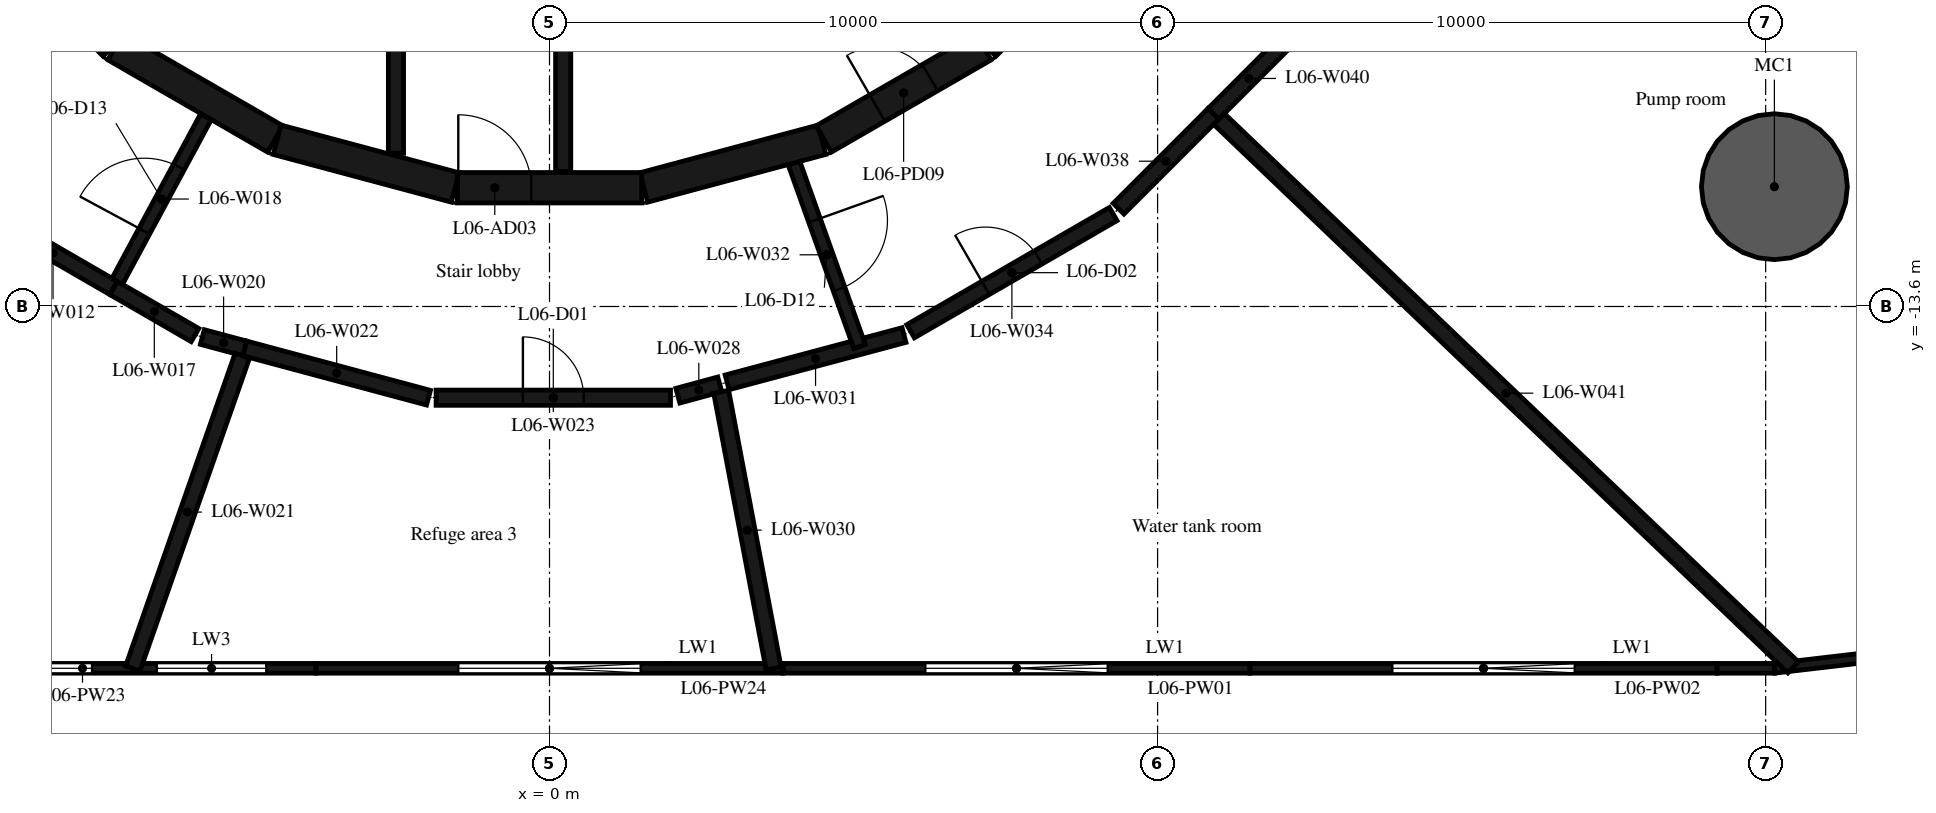
"""IFC4 building model, lengths in metres.
Left out: names, types, materials, properties, quantities, classifications, styles, units other than length and angle.
Written with IfcOpenShell. Run it as: python <this file> out.ifc"""

import sys

from ifc_helpers import new_model, si_unit, direction, frame, frame_2d, origin, origin_2d, place, context, subcontext, project, spatial, rectangle, hollow_circle, extrude, element, fill, save


model = new_model("IFC4")
c1 = context("Model", 3, precision=1e-05, world=origin(), true_north=direction((0.0, 1.0)))
c2 = subcontext(c1, "Body", "Model", "MODEL_VIEW")
j1 = project(units=[si_unit("LENGTHUNIT", "METRE"), si_unit("PLANEANGLEUNIT", "RADIAN")], contexts=[c1])
p1 = place(None, origin())
s1 = spatial("IfcSite", under=j1, at=p1, CompositionType="ELEMENT")
p2 = place(p1, origin())
s2 = spatial("IfcBuilding", under=s1, at=p2, CompositionType="ELEMENT")
p3 = place(p2, frame((0.0, 0.0, 33.0)))
s3 = spatial("IfcBuildingStorey", under=s2, at=p3, CompositionType="ELEMENT", Elevation=33.0)
p4 = place(p3, frame((20.144, -11.63, -0.45), z_axis=(0.0, 0.0, 1.0), x_axis=(1.0, 0.0, 0.0)))
e1 = element("IfcColumn", 1, at=p4, inside=s3, PredefinedType="COLUMN", context=c2, shape_type="SweptSolid", body=[
    extrude(hollow_circle(Radius=1.2, WallThickness=0.06, at=origin_2d()), origin(), (0.0, 0.0, 1.0), 5.4),
])
p5 = place(p3, frame((3.84, -19.55, 0.0), z_axis=(0.0, 0.0, 1.0), x_axis=(1.0, 0.0, 0.0)))
e2 = element("IfcWall", 2, at=p5, inside=s3, PredefinedType="STANDARD", context=c2, shape_type="SweptSolid", body=[
    extrude(rectangle(XDim=7.68, YDim=0.16, at=frame_2d((3.84, 0.0))), origin(), (0.0, 0.0, 1.0), 4.95),
])
p6 = place(p5, frame((2.34, 0.0, 1.0)))
e3 = element("IfcOpeningElement", 3, at=p6, cuts=e2, PredefinedType="OPENING", context=c2, shape_type="SweptSolid", body=[
    extrude(rectangle(XDim=3.0, YDim=2.2, at=frame_2d((1.5, 1.1))), frame((0.0, 0.09, 0.0), z_axis=(0.0, -1.0, 0.0), x_axis=(1.0, 0.0, 0.0)), (0.0, 0.0, 1.0), 0.18),
])
p7 = place(p3, frame((11.52, -19.55, 0.0), z_axis=(0.0, 0.0, 1.0), x_axis=(1.0, 0.0, 0.0)))
e4 = element("IfcWall", 4, at=p7, inside=s3, PredefinedType="STANDARD", context=c2, shape_type="SweptSolid", body=[
    extrude(rectangle(XDim=7.68, YDim=0.16, at=frame_2d((3.84, 0.0))), origin(), (0.0, 0.0, 1.0), 4.95),
])
p8 = place(p7, frame((2.34, 0.0, 1.0)))
e5 = element("IfcOpeningElement", 5, at=p8, cuts=e4, PredefinedType="OPENING", context=c2, shape_type="SweptSolid", body=[
    extrude(rectangle(XDim=3.0, YDim=2.2, at=frame_2d((1.5, 1.1))), frame((0.0, 0.09, 0.0), z_axis=(0.0, -1.0, 0.0), x_axis=(1.0, 0.0, 0.0)), (0.0, 0.0, 1.0), 0.18),
])
p9 = place(p3, frame((19.2, -19.55, 0.0), z_axis=(0.0, 0.0, 1.0), x_axis=(1.0, 0.0, 0.0)))
e6 = element("IfcWall", 6, at=p9, inside=s3, PredefinedType="STANDARD", context=c2, shape_type="SweptSolid", body=[
    extrude(rectangle(XDim=0.946, YDim=0.16, at=frame_2d((0.473, 0.0))), origin(), (0.0, 0.0, 1.0), 4.95),
])
p10 = place(p3, frame((20.141, -19.55, 0.0), z_axis=(0.0, 0.0, 1.0), x_axis=(0.993233418606, 0.116135163342, 0.0)))
e7 = element("IfcWall", 7, at=p10, inside=s3, PredefinedType="STANDARD", context=c2, shape_type="SweptSolid", body=[
    extrude(rectangle(XDim=1.846, YDim=0.16, at=frame_2d((0.923, 0.0))), origin(), (0.0, 0.0, 1.0), 4.95),
])
p11 = place(p3, frame((-11.52, -19.55, 0.0), z_axis=(0.0, 0.0, 1.0), x_axis=(1.0, 0.0, 0.0)))
e8 = element("IfcWall", 8, at=p11, inside=s3, PredefinedType="STANDARD", context=c2, shape_type="SweptSolid", body=[
    extrude(rectangle(XDim=7.68, YDim=0.16, at=frame_2d((3.84, 0.0))), origin(), (0.0, 0.0, 1.0), 4.95),
])
p12 = place(p11, frame((0.998, 0.0, 1.0)))
e9 = element("IfcOpeningElement", 9, at=p12, cuts=e8, PredefinedType="OPENING", context=c2, shape_type="SweptSolid", body=[
    extrude(rectangle(XDim=3.0, YDim=2.2, at=frame_2d((1.5, 1.1))), frame((0.0, 0.09, 0.0), z_axis=(0.0, -1.0, 0.0), x_axis=(1.0, 0.0, 0.0)), (0.0, 0.0, 1.0), 0.18),
])
p13 = place(p11, frame((5.062, 0.0, 1.0)))
e10 = element("IfcOpeningElement", 10, at=p13, cuts=e8, PredefinedType="OPENING", context=c2, shape_type="SweptSolid", body=[
    extrude(rectangle(XDim=1.8, YDim=2.2, at=frame_2d((0.9, 1.1))), frame((0.0, 0.09, 0.0), z_axis=(0.0, -1.0, 0.0), x_axis=(1.0, 0.0, 0.0)), (0.0, 0.0, 1.0), 0.18),
])
p14 = place(p3, frame((-3.84, -19.55, 0.0), z_axis=(0.0, 0.0, 1.0), x_axis=(1.0, 0.0, 0.0)))
e11 = element("IfcWall", 11, at=p14, inside=s3, PredefinedType="STANDARD", context=c2, shape_type="SweptSolid", body=[
    extrude(rectangle(XDim=7.68, YDim=0.16, at=frame_2d((3.84, 0.0))), origin(), (0.0, 0.0, 1.0), 4.95),
])
p15 = place(p14, frame((2.34, 0.0, 1.0)))
e12 = element("IfcOpeningElement", 12, at=p15, cuts=e11, PredefinedType="OPENING", context=c2, shape_type="SweptSolid", body=[
    extrude(rectangle(XDim=3.0, YDim=2.2, at=frame_2d((1.5, 1.1))), frame((0.0, 0.09, 0.0), z_axis=(0.0, -1.0, 0.0), x_axis=(1.0, 0.0, 0.0)), (0.0, 0.0, 1.0), 0.18),
])
p16 = place(p3, frame((1.55, -11.643, 0.0), z_axis=(0.0, 0.0, 1.0), x_axis=(0.965948410781, 0.258734743916, 0.0)))
e13 = element("IfcWall", 13, at=p16, inside=s3, PredefinedType="SHEAR", context=c2, shape_type="SweptSolid", body=[
    extrude(rectangle(XDim=3.033, YDim=0.5, at=frame_2d((1.516, 0.0))), origin(), (0.0, 0.0, 1.0), 4.95),
])
p17 = place(p3, frame((4.51, -10.845, 0.0), z_axis=(0.0, 0.0, 1.0), x_axis=(0.865975092491, 0.500087131594, 0.0)))
e14 = element("IfcWall", 14, at=p17, inside=s3, PredefinedType="SHEAR", context=c2, shape_type="SweptSolid", body=[
    extrude(rectangle(XDim=3.033, YDim=0.5, at=frame_2d((1.516, 0.0))), origin(), (0.0, 0.0, 1.0), 4.95),
])
p18 = place(p17, frame((1.016, 0.0, 0.0)))
e15 = element("IfcOpeningElement", 15, at=p18, cuts=e14, PredefinedType="OPENING", context=c2, shape_type="SweptSolid", body=[
    extrude(rectangle(XDim=1.0, YDim=2.4, at=frame_2d((0.5, 1.2))), frame((0.0, 0.26, 0.0), z_axis=(0.0, -1.0, 0.0), x_axis=(1.0, 0.0, 0.0)), (0.0, 0.0, 1.0), 0.52),
])
for number, where, z_axis, x_axis in (
    (16, (7.164, -9.308, 0.0), (0.0, 0.0, 1.0), (0.707, 0.707, 0.0)),
    (17, (-9.308, -7.164, 0.0), (0.0, 0.0, 1.0), (0.707, -0.707, 0.0)),
):
    element("IfcWall", number, at=place(p3, frame(where, z_axis=z_axis, x_axis=x_axis)), inside=s3, PredefinedType="SHEAR", context=c2, shape_type="SweptSolid", body=[
        extrude(rectangle(XDim=3.032, YDim=0.5, at=frame_2d((1.516, 0.0))), origin(), (0.0, 0.0, 1.0), 4.95),
    ])
for number, where, z_axis, x_axis in (
    (18, (-7.137, -9.329, 0.0), (0.0, 0.0, 1.0), (0.866, -0.5, 0.0)),
    (19, (-4.479, -10.858, 0.0), (0.0, 0.0, 1.0), (0.966, -0.259, 0.0)),
):
    element("IfcWall", number, at=place(p3, frame(where, z_axis=z_axis, x_axis=x_axis)), inside=s3, PredefinedType="SHEAR", context=c2, shape_type="SweptSolid", body=[
        extrude(rectangle(XDim=3.033, YDim=0.5, at=frame_2d((1.516, 0.0))), origin(), (0.0, 0.0, 1.0), 4.95),
    ])
p19 = place(p3, frame((-1.516, -11.647, 0.0), z_axis=(0.0, 0.0, 1.0), x_axis=(1.0, 0.0, 0.0)))
e20 = element("IfcWall", 20, at=p19, inside=s3, PredefinedType="SHEAR", context=c2, shape_type="SweptSolid", body=[
    extrude(rectangle(XDim=3.033, YDim=0.5, at=frame_2d((1.516, 0.0))), origin(), (0.0, 0.0, 1.0), 4.95),
])
p20 = place(p19, frame((0.016, 0.0, 0.0)))
e21 = element("IfcOpeningElement", 21, at=p20, cuts=e20, PredefinedType="OPENING", context=c2, shape_type="SweptSolid", body=[
    extrude(rectangle(XDim=1.2, YDim=2.1, at=frame_2d((0.6, 1.05))), frame((0.0, 0.26, 0.0), z_axis=(0.0, -1.0, 0.0), x_axis=(1.0, 0.0, 0.0)), (0.0, 0.0, 1.0), 0.52),
])
p21 = place(p3, frame((-2.525, -8.97, 0.0), z_axis=(0.0, 0.0, 1.0), x_axis=(0.0, -1.0, 0.0)))
e22 = element("IfcWall", 22, at=p21, inside=s3, PredefinedType="SHEAR", context=c2, shape_type="SweptSolid", body=[
    extrude(rectangle(XDim=2.11, YDim=0.25, at=frame_2d((1.055, 0.0))), origin(), (0.0, 0.0, 1.0), 4.95),
])
p22 = place(p3, frame((0.225, -8.97, 0.0), z_axis=(0.0, 0.0, 1.0), x_axis=(0.0, -1.0, 0.0)))
e23 = element("IfcWall", 23, at=p22, inside=s3, PredefinedType="SHEAR", context=c2, shape_type="SweptSolid", body=[
    extrude(rectangle(XDim=2.41, YDim=0.25, at=frame_2d((1.205, 0.0))), origin(), (0.0, 0.0, 1.0), 4.95),
])
p23 = place(p3, frame((-9.162, -12.143, 0.0), z_axis=(0.0, 0.0, 1.0), x_axis=(0.865576208327, -0.500777223502, 0.0)))
e24 = element("IfcWall", 24, at=p23, inside=s3, PredefinedType="PARTITIONING", context=c2, shape_type="SweptSolid", body=[
    extrude(rectangle(XDim=2.303, YDim=0.25, at=frame_2d((1.152, 0.0))), origin(), (0.0, 0.0, 1.0), 4.95),
])
p24 = place(p3, frame((-7.168, -13.296, 0.0), z_axis=(0.0, 0.0, 1.0), x_axis=(0.865606471313, -0.500724911325, 0.0)))
e25 = element("IfcWall", 25, at=p24, inside=s3, PredefinedType="PARTITIONING", context=c2, shape_type="SweptSolid", body=[
    extrude(rectangle(XDim=1.546, YDim=0.25, at=frame_2d((0.773, 0.0))), origin(), (0.0, 0.0, 1.0), 4.95),
])
p25 = place(p3, frame((-7.109, -13.186, 0.0), z_axis=(0.0, 0.0, 1.0), x_axis=(0.474511788195, 0.880249148176, 0.0)))
e26 = element("IfcWall", 26, at=p25, inside=s3, PredefinedType="PARTITIONING", context=c2, shape_type="SweptSolid", body=[
    extrude(rectangle(XDim=3.074, YDim=0.2, at=frame_2d((1.537, 0.0))), origin(), (0.0, 0.0, 1.0), 4.95),
])
p26 = place(p25, frame((0.937, 0.0, 0.0)))
e27 = element("IfcOpeningElement", 27, at=p26, cuts=e26, PredefinedType="OPENING", context=c2, shape_type="SweptSolid", body=[
    extrude(rectangle(XDim=1.2, YDim=2.1, at=frame_2d((0.6, 1.05))), frame((0.0, 0.11, 0.0), z_axis=(0.0, -1.0, 0.0), x_axis=(1.0, 0.0, 0.0)), (0.0, 0.0, 1.0), 0.22),
])
p27 = place(p3, frame((-5.709, -14.102, 0.0), z_axis=(0.0, 0.0, 1.0), x_axis=(0.965791356005, -0.25932037457, 0.0)))
e28 = element("IfcWall", 28, at=p27, inside=s3, PredefinedType="PARTITIONING", context=c2, shape_type="SweptSolid", body=[
    extrude(rectangle(XDim=0.724, YDim=0.25, at=frame_2d((0.362, 0.0))), origin(), (0.0, 0.0, 1.0), 4.95),
])
p28 = place(p3, frame((-5.051, -14.408, 0.0), z_axis=(0.0, 0.0, 1.0), x_axis=(-0.330509965362, -0.943802502008, 0.0)))
e29 = element("IfcWall", 29, at=p28, inside=s3, PredefinedType="PARTITIONING", context=c2, shape_type="SweptSolid", body=[
    extrude(rectangle(XDim=5.453, YDim=0.25, at=frame_2d((2.727, 0.0))), origin(), (0.0, 0.0, 1.0), 4.95),
])
p29 = place(p3, frame((-5.01, -14.29, 0.0), z_axis=(0.0, 0.0, 1.0), x_axis=(0.965858087727, -0.259071716659, 0.0)))
e30 = element("IfcWall", 30, at=p29, inside=s3, PredefinedType="PARTITIONING", context=c2, shape_type="SweptSolid", body=[
    extrude(rectangle(XDim=3.127, YDim=0.25, at=frame_2d((1.563, 0.0))), origin(), (0.0, 0.0, 1.0), 4.95),
])
p30 = place(p3, frame((-1.865, -15.1, 0.0), z_axis=(0.0, 0.0, 1.0), x_axis=(1.0, 0.0, 0.0)))
e31 = element("IfcWall", 31, at=p30, inside=s3, PredefinedType="PARTITIONING", context=c2, shape_type="SweptSolid", body=[
    extrude(rectangle(XDim=3.855, YDim=0.25, at=frame_2d((1.927, 0.0))), origin(), (0.0, 0.0, 1.0), 4.95),
])
p31 = place(p30, frame((1.427, 0.0, 0.0)))
e32 = element("IfcOpeningElement", 32, at=p31, cuts=e31, PredefinedType="OPENING", context=c2, shape_type="SweptSolid", body=[
    extrude(rectangle(XDim=1.0, YDim=2.1, at=frame_2d((0.5, 1.05))), frame((0.0, 0.135, 0.0), z_axis=(0.0, -1.0, 0.0), x_axis=(1.0, 0.0, 0.0)), (0.0, 0.0, 1.0), 0.27),
])
p32 = place(p3, frame((2.111, -15.067, 0.0), z_axis=(0.0, 0.0, 1.0), x_axis=(0.965039301335, 0.262105221007, 0.0)))
e33 = element("IfcWall", 33, at=p32, inside=s3, PredefinedType="PARTITIONING", context=c2, shape_type="SweptSolid", body=[
    extrude(rectangle(XDim=0.714, YDim=0.25, at=frame_2d((0.357, 0.0))), origin(), (0.0, 0.0, 1.0), 4.95),
])
p33 = place(p3, frame((2.823, -15.003, 0.0), z_axis=(0.0, 0.0, 1.0), x_axis=(0.186157236823, -0.982519965791, 0.0)))
e34 = element("IfcWall", 34, at=p33, inside=s3, PredefinedType="PARTITIONING", context=c2, shape_type="SweptSolid", body=[
    extrude(rectangle(XDim=4.629, YDim=0.25, at=frame_2d((2.315, 0.0))), origin(), (0.0, 0.0, 1.0), 4.95),
])
p34 = place(p3, frame((2.921, -14.848, 0.0), z_axis=(0.0, 0.0, 1.0), x_axis=(0.966090816863, 0.258202504969, 0.0)))
e35 = element("IfcWall", 35, at=p34, inside=s3, PredefinedType="PARTITIONING", context=c2, shape_type="SweptSolid", body=[
    extrude(rectangle(XDim=3.011, YDim=0.25, at=frame_2d((1.506, 0.0))), origin(), (0.0, 0.0, 1.0), 4.95),
])
p35 = place(p3, frame((4.02, -11.24, 0.0), z_axis=(0.0, 0.0, 1.0), x_axis=(0.336751058688, -0.941593715183, 0.0)))
e36 = element("IfcWall", 36, at=p35, inside=s3, PredefinedType="PARTITIONING", context=c2, shape_type="SweptSolid", body=[
    extrude(rectangle(XDim=3.207, YDim=0.2, at=frame_2d((1.604, 0.0))), origin(), (0.0, 0.0, 1.0), 4.95),
])
p36 = place(p35, frame((1.004, 0.0, 0.0)))
e37 = element("IfcOpeningElement", 37, at=p36, cuts=e36, PredefinedType="OPENING", context=c2, shape_type="SweptSolid", body=[
    extrude(rectangle(XDim=1.2, YDim=2.1, at=frame_2d((0.6, 1.05))), frame((0.0, 0.11, 0.0), z_axis=(0.0, -1.0, 0.0), x_axis=(1.0, 0.0, 0.0)), (0.0, 0.0, 1.0), 0.22),
])
p37 = place(p3, frame((5.938, -14.007, 0.0), z_axis=(0.0, 0.0, 1.0), x_axis=(0.865615852585, 0.500708693508, 0.0)))
e38 = element("IfcWall", 38, at=p37, inside=s3, PredefinedType="PARTITIONING", context=c2, shape_type="SweptSolid", body=[
    extrude(rectangle(XDim=3.849, YDim=0.25, at=frame_2d((1.925, 0.0))), origin(), (0.0, 0.0, 1.0), 4.95),
])
p38 = place(p37, frame((1.425, 0.0, 0.0)))
e39 = element("IfcOpeningElement", 39, at=p38, cuts=e38, PredefinedType="OPENING", context=c2, shape_type="SweptSolid", body=[
    extrude(rectangle(XDim=1.0, YDim=2.1, at=frame_2d((0.5, 1.05))), frame((0.0, 0.135, 0.0), z_axis=(0.0, -1.0, 0.0), x_axis=(1.0, 0.0, 0.0)), (0.0, 0.0, 1.0), 0.27),
])
p39 = place(p3, frame((9.358, -11.992, 0.0), z_axis=(0.0, 0.0, 1.0), x_axis=(0.707051506082, 0.707162051971, 0.0)))
e40 = element("IfcWall", 40, at=p39, inside=s3, PredefinedType="PARTITIONING", context=c2, shape_type="SweptSolid", body=[
    extrude(rectangle(XDim=2.208, YDim=0.25, at=frame_2d((1.104, 0.0))), origin(), (0.0, 0.0, 1.0), 4.95),
])
p40 = place(p3, frame((10.92, -10.43, 0.0), z_axis=(0.0, 0.0, 1.0), x_axis=(0.707181186066, 0.707032368477, 0.0)))
e41 = element("IfcWall", 41, at=p40, inside=s3, PredefinedType="PARTITIONING", context=c2, shape_type="SweptSolid", body=[
    extrude(rectangle(XDim=1.641, YDim=0.25, at=frame_2d((0.82, 0.0))), origin(), (0.0, 0.0, 1.0), 4.95),
])
p41 = place(p3, frame((11.01, -10.516, 0.0), z_axis=(0.0, 0.0, 1.0), x_axis=(0.723132638847, -0.690709191074, 0.0)))
e42 = element("IfcWall", 42, at=p41, inside=s3, PredefinedType="PARTITIONING", context=c2, shape_type="SweptSolid", body=[
    extrude(rectangle(XDim=13.057, YDim=0.25, at=frame_2d((6.528, 0.0))), origin(), (0.0, 0.0, 1.0), 4.95),
])
p42 = place(p6, origin())
e43 = element("IfcWindow", 43, at=p42, inside=s3, PartitioningType="SINGLE_PANEL", PredefinedType="WINDOW", context=c2, shape_type="SweptSolid", body=[
    extrude(rectangle(XDim=3.0, YDim=2.2, at=frame_2d((1.5, 1.1))), frame((0.0, 0.03, 0.0), z_axis=(0.0, -1.0, 0.0), x_axis=(1.0, 0.0, 0.0)), (0.0, 0.0, 1.0), 0.06),
])
fill(e3, e43)
p43 = place(p8, origin())
e44 = element("IfcWindow", 44, at=p43, inside=s3, PartitioningType="SINGLE_PANEL", PredefinedType="WINDOW", context=c2, shape_type="SweptSolid", body=[
    extrude(rectangle(XDim=3.0, YDim=2.2, at=frame_2d((1.5, 1.1))), frame((0.0, 0.03, 0.0), z_axis=(0.0, -1.0, 0.0), x_axis=(1.0, 0.0, 0.0)), (0.0, 0.0, 1.0), 0.06),
])
fill(e5, e44)
p44 = place(p12, origin())
e45 = element("IfcWindow", 45, at=p44, inside=s3, PartitioningType="SINGLE_PANEL", PredefinedType="WINDOW", context=c2, shape_type="SweptSolid", body=[
    extrude(rectangle(XDim=3.0, YDim=2.2, at=frame_2d((1.5, 1.1))), frame((0.0, 0.03, 0.0), z_axis=(0.0, -1.0, 0.0), x_axis=(1.0, 0.0, 0.0)), (0.0, 0.0, 1.0), 0.06),
])
fill(e9, e45)
p45 = place(p13, origin())
e46 = element("IfcWindow", 46, at=p45, inside=s3, PartitioningType="SINGLE_PANEL", PredefinedType="WINDOW", context=c2, shape_type="SweptSolid", body=[
    extrude(rectangle(XDim=1.8, YDim=2.2, at=frame_2d((0.9, 1.1))), frame((0.0, 0.03, 0.0), z_axis=(0.0, -1.0, 0.0), x_axis=(1.0, 0.0, 0.0)), (0.0, 0.0, 1.0), 0.06),
])
fill(e10, e46)
p46 = place(p15, origin())
e47 = element("IfcWindow", 47, at=p46, inside=s3, PartitioningType="SINGLE_PANEL", PredefinedType="WINDOW", context=c2, shape_type="SweptSolid", body=[
    extrude(rectangle(XDim=3.0, YDim=2.2, at=frame_2d((1.5, 1.1))), frame((0.0, 0.03, 0.0), z_axis=(0.0, -1.0, 0.0), x_axis=(1.0, 0.0, 0.0)), (0.0, 0.0, 1.0), 0.06),
])
fill(e12, e47)
p47 = place(p20, origin())
e48 = element("IfcDoor", 48, at=p47, inside=s3, OperationType="SINGLE_SWING_RIGHT", PredefinedType="DOOR", context=c2, shape_type="SweptSolid", body=[
    extrude(rectangle(XDim=1.2, YDim=2.1, at=frame_2d((0.6, 1.05))), frame((0.0, 0.025, 0.0), z_axis=(0.0, -1.0, 0.0), x_axis=(1.0, 0.0, 0.0)), (0.0, 0.0, 1.0), 0.05),
])
fill(e21, e48)
p48 = place(p18, origin())
e49 = element("IfcDoor", 49, at=p48, inside=s3, OperationType="SINGLE_SWING_RIGHT", PredefinedType="DOOR", context=c2, shape_type="SweptSolid", body=[
    extrude(rectangle(XDim=1.0, YDim=2.4, at=frame_2d((0.5, 1.2))), frame((0.0, 0.025, 0.0), z_axis=(0.0, -1.0, 0.0), x_axis=(1.0, 0.0, 0.0)), (0.0, 0.0, 1.0), 0.05),
])
fill(e15, e49)
p49 = place(p31, origin())
e50 = element("IfcDoor", 50, at=p49, inside=s3, OperationType="SINGLE_SWING_LEFT", PredefinedType="DOOR", context=c2, shape_type="SweptSolid", body=[
    extrude(rectangle(XDim=1.0, YDim=2.1, at=frame_2d((0.5, 1.05))), frame((0.0, 0.025, 0.0), z_axis=(0.0, -1.0, 0.0), x_axis=(1.0, 0.0, 0.0)), (0.0, 0.0, 1.0), 0.05),
])
fill(e32, e50)
p50 = place(p38, origin())
e51 = element("IfcDoor", 51, at=p50, inside=s3, OperationType="SINGLE_SWING_LEFT", PredefinedType="DOOR", context=c2, shape_type="SweptSolid", body=[
    extrude(rectangle(XDim=1.0, YDim=2.1, at=frame_2d((0.5, 1.05))), frame((0.0, 0.025, 0.0), z_axis=(0.0, -1.0, 0.0), x_axis=(1.0, 0.0, 0.0)), (0.0, 0.0, 1.0), 0.05),
])
fill(e39, e51)
p51 = place(p36, origin())
e52 = element("IfcDoor", 52, at=p51, inside=s3, OperationType="SINGLE_SWING_LEFT", PredefinedType="DOOR", context=c2, shape_type="SweptSolid", body=[
    extrude(rectangle(XDim=1.2, YDim=2.1, at=frame_2d((0.6, 1.05))), frame((0.0, 0.025, 0.0), z_axis=(0.0, -1.0, 0.0), x_axis=(1.0, 0.0, 0.0)), (0.0, 0.0, 1.0), 0.05),
])
fill(e37, e52)
p52 = place(p26, origin())
e53 = element("IfcDoor", 53, at=p52, inside=s3, OperationType="SINGLE_SWING_LEFT", PredefinedType="DOOR", context=c2, shape_type="SweptSolid", body=[
    extrude(rectangle(XDim=1.2, YDim=2.1, at=frame_2d((0.6, 1.05))), frame((0.0, 0.025, 0.0), z_axis=(0.0, -1.0, 0.0), x_axis=(1.0, 0.0, 0.0)), (0.0, 0.0, 1.0), 0.05),
])
fill(e27, e53)
save(model, sys.argv[1])
